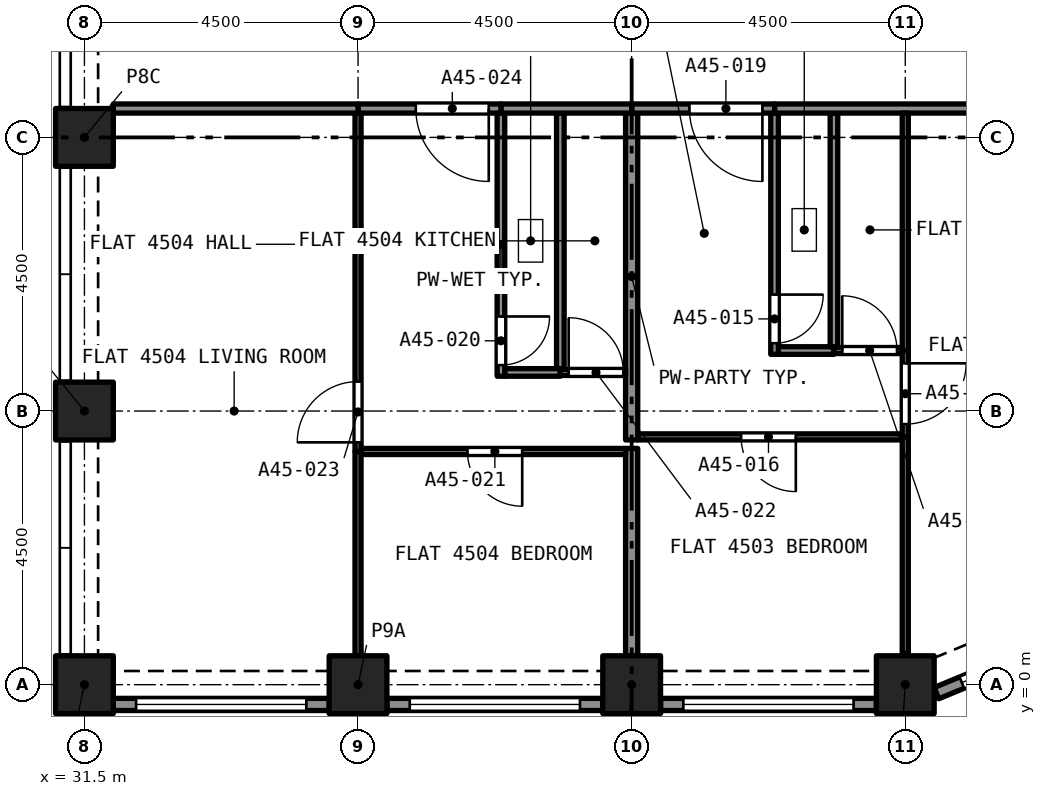
"""IFC4 building model, lengths in metres.
Left out: names, types, materials, properties, quantities, classifications, styles, units other than length and angle.
Written with IfcOpenShell. Run it as: python <this file> out.ifc"""

import sys

from ifc_helpers import new_model, si_unit, direction, frame, frame_2d, origin, origin_2d, place, context, subcontext, project, spatial, rectangle, extrude, element, fill, save


model = new_model("IFC4")
c1 = context("Model", 3, precision=1e-05, world=origin(), true_north=direction((0.0, 1.0)))
c2 = subcontext(c1, "Body", "Model", "MODEL_VIEW")
j1 = project(units=[si_unit("LENGTHUNIT", "METRE"), si_unit("PLANEANGLEUNIT", "RADIAN")], contexts=[c1])
p1 = place(None, origin())
s1 = spatial("IfcSite", under=j1, at=p1, CompositionType="ELEMENT")
p2 = place(p1, origin())
s2 = spatial("IfcBuilding", under=s1, at=p2, CompositionType="ELEMENT")
p3 = place(p2, frame((0.0, 0.0, 163.8)))
s3 = spatial("IfcBuildingStorey", under=s2, at=p3, CompositionType="ELEMENT", Elevation=163.8)
for number, where, z_axis, x_axis in (
    (1, (31.5, 0.0, 0.0), (0.0, 0.0, 1.0), (1.0, 0.0, 0.0)),
    (2, (36.0, 0.0, 0.0), (0.0, 0.0, 1.0), (1.0, 0.0, 0.0)),
    (3, (40.5, 0.0, 0.0), (0.0, 0.0, 1.0), (1.0, 0.0, 0.0)),
    (4, (45.0, 0.0, 0.0), (0.0, 0.0, 1.0), (1.0, 0.0, 0.0)),
    (5, (31.5, 4.5, 0.0), (0.0, 0.0, 1.0), (1.0, 0.0, 0.0)),
    (6, (31.5, 9.0, 0.0), (0.0, 0.0, 1.0), (1.0, 0.0, 0.0)),
):
    element("IfcColumn", number, at=place(p3, frame(where, z_axis=z_axis, x_axis=x_axis)), inside=s3, PredefinedType="COLUMN", context=c2, shape_type="SweptSolid", body=[
        extrude(rectangle(XDim=0.95, YDim=0.95, at=origin_2d()), origin(), (0.0, 0.0, 1.0), 4.4),
    ])
p4 = place(p3, frame((35.525, -0.325, 0.0), z_axis=(0.0, 0.0, 1.0), x_axis=(-1.0, 0.0, 0.0)))
e7 = element("IfcWall", 7, at=p4, inside=s3, PredefinedType="SOLIDWALL", context=c2, shape_type="SweptSolid", body=[
    extrude(rectangle(XDim=3.55, YDim=0.2, at=frame_2d((1.775, 0.0))), origin(), (0.0, 0.0, 1.0), 4.4),
])
p5 = place(p4, frame((0.375, 0.0, 0.45)))
e8 = element("IfcOpeningElement", 8, at=p5, cuts=e7, PredefinedType="OPENING", context=c2, shape_type="SweptSolid", body=[
    extrude(rectangle(XDim=2.8, YDim=2.55, at=frame_2d((1.4, 1.275))), frame((0.0, 0.11, 0.0), z_axis=(0.0, -1.0, 0.0), x_axis=(1.0, 0.0, 0.0)), (0.0, 0.0, 1.0), 0.22),
])
p6 = place(p3, frame((40.025, -0.325, 0.0), z_axis=(0.0, 0.0, 1.0), x_axis=(-1.0, 0.0, 0.0)))
e9 = element("IfcWall", 9, at=p6, inside=s3, PredefinedType="SOLIDWALL", context=c2, shape_type="SweptSolid", body=[
    extrude(rectangle(XDim=3.55, YDim=0.2, at=frame_2d((1.775, 0.0))), origin(), (0.0, 0.0, 1.0), 4.4),
])
p7 = place(p6, frame((0.375, 0.0, 0.45)))
e10 = element("IfcOpeningElement", 10, at=p7, cuts=e9, PredefinedType="OPENING", context=c2, shape_type="SweptSolid", body=[
    extrude(rectangle(XDim=2.8, YDim=2.55, at=frame_2d((1.4, 1.275))), frame((0.0, 0.11, 0.0), z_axis=(0.0, -1.0, 0.0), x_axis=(1.0, 0.0, 0.0)), (0.0, 0.0, 1.0), 0.22),
])
p8 = place(p3, frame((44.525, -0.325, 0.0), z_axis=(0.0, 0.0, 1.0), x_axis=(-1.0, 0.0, 0.0)))
e11 = element("IfcWall", 11, at=p8, inside=s3, PredefinedType="SOLIDWALL", context=c2, shape_type="SweptSolid", body=[
    extrude(rectangle(XDim=3.55, YDim=0.2, at=frame_2d((1.775, 0.0))), origin(), (0.0, 0.0, 1.0), 4.4),
])
p9 = place(p8, frame((0.375, 0.0, 0.45)))
e12 = element("IfcOpeningElement", 12, at=p9, cuts=e11, PredefinedType="OPENING", context=c2, shape_type="SweptSolid", body=[
    extrude(rectangle(XDim=2.8, YDim=2.55, at=frame_2d((1.4, 1.275))), frame((0.0, 0.11, 0.0), z_axis=(0.0, -1.0, 0.0), x_axis=(1.0, 0.0, 0.0)), (0.0, 0.0, 1.0), 0.22),
])
p10 = place(p3, frame((47.733, 0.78, 0.0), z_axis=(0.0, 0.0, 1.0), x_axis=(-0.923880599843, -0.382680855588, 0.0)))
e13 = element("IfcWall", 13, at=p10, inside=s3, PredefinedType="SOLIDWALL", context=c2, shape_type="SweptSolid", body=[
    extrude(rectangle(XDim=2.403, YDim=0.2, at=frame_2d((1.201, 0.0))), origin(), (0.0, 0.0, 1.0), 4.4),
])
p11 = place(p10, frame((0.251, 0.0, 0.45)))
e14 = element("IfcOpeningElement", 14, at=p11, cuts=e13, PredefinedType="OPENING", context=c2, shape_type="SweptSolid", body=[
    extrude(rectangle(XDim=1.7, YDim=2.55, at=frame_2d((0.85, 1.275))), frame((0.0, 0.11, 0.0), z_axis=(0.0, -1.0, 0.0), x_axis=(1.0, 0.0, 0.0)), (0.0, 0.0, 1.0), 0.22),
])
p12 = place(p3, frame((42.913, 5.495, 0.0), z_axis=(0.0, 0.0, 1.0), x_axis=(1.0, 0.0, 0.0)))
e15 = element("IfcWall", 15, at=p12, inside=s3, PredefinedType="PARTITIONING", context=c2, shape_type="SweptSolid", body=[
    extrude(rectangle(XDim=0.915, YDim=0.125, at=frame_2d((0.458, 0.0))), origin(), (0.0, 0.0, 1.0), 4.1),
])
p13 = place(p3, frame((42.85, 9.4, 0.0), z_axis=(0.0, 0.0, 1.0), x_axis=(0.0, -1.0, 0.0)))
e16 = element("IfcWall", 16, at=p13, inside=s3, PredefinedType="PARTITIONING", context=c2, shape_type="SweptSolid", body=[
    extrude(rectangle(XDim=3.967, YDim=0.125, at=frame_2d((1.984, 0.0))), origin(), (0.0, 0.0, 1.0), 4.1),
])
p14 = place(p13, frame((2.985, 0.0, 0.0)))
e17 = element("IfcOpeningElement", 17, at=p14, cuts=e16, PredefinedType="OPENING", context=c2, shape_type="SweptSolid", body=[
    extrude(rectangle(XDim=0.8, YDim=2.1, at=frame_2d((0.4, 1.05))), frame((0.0, 0.073, 0.0), z_axis=(0.0, -1.0, 0.0), x_axis=(1.0, 0.0, 0.0)), (0.0, 0.0, 1.0), 0.145),
])
p15 = place(p3, frame((43.827, 5.558, 0.0), z_axis=(0.0, 0.0, 1.0), x_axis=(0.0, 1.0, 0.0)))
e18 = element("IfcWall", 18, at=p15, inside=s3, PredefinedType="PARTITIONING", context=c2, shape_type="SweptSolid", body=[
    extrude(rectangle(XDim=3.842, YDim=0.125, at=frame_2d((1.921, 0.0))), origin(), (0.0, 0.0, 1.0), 4.1),
])
p16 = place(p3, frame((42.85, 9.475, 0.0), z_axis=(0.0, 0.0, 1.0), x_axis=(1.0, 0.0, 0.0)))
e19 = element("IfcWall", 19, at=p16, inside=s3, PredefinedType="PARTITIONING", context=c2, shape_type="SweptSolid", body=[
    extrude(rectangle(XDim=6.175, YDim=0.15, at=frame_2d((3.087, 0.0))), origin(), (0.0, 0.0, 1.0), 4.1),
])
p17 = place(p3, frame((44.95, 4.075, 0.0), z_axis=(0.0, 0.0, 1.0), x_axis=(-1.0, 0.0, 0.0)))
e20 = element("IfcWall", 20, at=p17, inside=s3, PredefinedType="PARTITIONING", context=c2, shape_type="SweptSolid", body=[
    extrude(rectangle(XDim=4.35, YDim=0.1, at=frame_2d((2.175, 0.0))), origin(), (0.0, 0.0, 1.0), 4.1),
])
p18 = place(p17, frame((1.75, 0.0, 0.0)))
e21 = element("IfcOpeningElement", 21, at=p18, cuts=e20, PredefinedType="OPENING", context=c2, shape_type="SweptSolid", body=[
    extrude(rectangle(XDim=0.9, YDim=2.1, at=frame_2d((0.45, 1.05))), frame((0.0, 0.06, 0.0), z_axis=(0.0, -1.0, 0.0), x_axis=(1.0, 0.0, 0.0)), (0.0, 0.0, 1.0), 0.12),
])
p19 = place(p3, frame((45.0, 0.514, 0.0), z_axis=(0.0, 0.0, 1.0), x_axis=(0.0, 1.0, 0.0)))
e22 = element("IfcWall", 22, at=p19, inside=s3, PredefinedType="PARTITIONING", context=c2, shape_type="SweptSolid", body=[
    extrude(rectangle(XDim=3.561, YDim=0.1, at=frame_2d((1.78, 0.0))), origin(), (0.0, 0.0, 1.0), 4.1),
])
p20 = place(p3, frame((40.5, 0.475, 0.0), z_axis=(0.0, 0.0, 1.0), x_axis=(0.0, 1.0, 0.0)))
e23 = element("IfcWall", 23, at=p20, inside=s3, PredefinedType="PARTITIONING", context=c2, shape_type="SweptSolid", body=[
    extrude(rectangle(XDim=3.41, YDim=0.2, at=frame_2d((1.705, 0.0))), origin(), (0.0, 0.0, 1.0), 4.1),
])
p21 = place(p3, frame((43.827, 5.495, 0.0), z_axis=(0.0, 0.0, 1.0), x_axis=(1.0, 0.0, 0.0)))
e24 = element("IfcWall", 24, at=p21, inside=s3, PredefinedType="PARTITIONING", context=c2, shape_type="SweptSolid", body=[
    extrude(rectangle(XDim=1.123, YDim=0.1, at=frame_2d((0.561, 0.0))), origin(), (0.0, 0.0, 1.0), 4.1),
])
p22 = place(p21, frame((0.136, 0.0, 0.0)))
e25 = element("IfcOpeningElement", 25, at=p22, cuts=e24, PredefinedType="OPENING", context=c2, shape_type="SweptSolid", body=[
    extrude(rectangle(XDim=0.9, YDim=2.1, at=frame_2d((0.45, 1.05))), frame((0.0, 0.06, 0.0), z_axis=(0.0, -1.0, 0.0), x_axis=(1.0, 0.0, 0.0)), (0.0, 0.0, 1.0), 0.12),
])
p23 = place(p3, frame((45.0, 5.495, 0.0), z_axis=(0.0, 0.0, 1.0), x_axis=(0.0, -1.0, 0.0)))
e26 = element("IfcWall", 26, at=p23, inside=s3, PredefinedType="PARTITIONING", context=c2, shape_type="SweptSolid", body=[
    extrude(rectangle(XDim=1.42, YDim=0.1, at=frame_2d((0.71, 0.0))), origin(), (0.0, 0.0, 1.0), 4.1),
])
p24 = place(p23, frame((0.21, 0.0, 0.0)))
e27 = element("IfcOpeningElement", 27, at=p24, cuts=e26, PredefinedType="OPENING", context=c2, shape_type="SweptSolid", body=[
    extrude(rectangle(XDim=1.0, YDim=2.1, at=frame_2d((0.5, 1.05))), frame((0.0, 0.06, 0.0), z_axis=(0.0, -1.0, 0.0), x_axis=(1.0, 0.0, 0.0)), (0.0, 0.0, 1.0), 0.12),
])
p25 = place(p3, frame((40.5, 4.025, 0.0), z_axis=(0.0, 0.0, 1.0), x_axis=(0.0, 1.0, 0.0)))
e28 = element("IfcWall", 28, at=p25, inside=s3, PredefinedType="PARTITIONING", context=c2, shape_type="SweptSolid", body=[
    extrude(rectangle(XDim=5.375, YDim=0.2, at=frame_2d((2.688, 0.0))), origin(), (0.0, 0.0, 1.0), 4.1),
])
p26 = place(p3, frame((42.85, 9.475, 0.0), z_axis=(0.0, 0.0, 1.0), x_axis=(-1.0, 0.0, 0.0)))
e29 = element("IfcWall", 29, at=p26, inside=s3, PredefinedType="PARTITIONING", context=c2, shape_type="SweptSolid", body=[
    extrude(rectangle(XDim=2.35, YDim=0.15, at=frame_2d((1.175, 0.0))), origin(), (0.0, 0.0, 1.0), 4.1),
])
p27 = place(p26, frame((0.2, 0.0, 0.0)))
e30 = element("IfcOpeningElement", 30, at=p27, cuts=e29, PredefinedType="OPENING", context=c2, shape_type="SweptSolid", body=[
    extrude(rectangle(XDim=1.2, YDim=2.4, at=frame_2d((0.6, 1.2))), frame((0.0, 0.085, 0.0), z_axis=(0.0, -1.0, 0.0), x_axis=(1.0, 0.0, 0.0)), (0.0, 0.0, 1.0), 0.17),
])
p28 = place(p3, frame((45.0, 5.495, 0.0), z_axis=(0.0, 0.0, 1.0), x_axis=(0.0, 1.0, 0.0)))
e31 = element("IfcWall", 31, at=p28, inside=s3, PredefinedType="PARTITIONING", context=c2, shape_type="SweptSolid", body=[
    extrude(rectangle(XDim=3.905, YDim=0.1, at=frame_2d((1.952, 0.0))), origin(), (0.0, 0.0, 1.0), 4.1),
])
p29 = place(p3, frame((38.413, 5.135, 0.0), z_axis=(0.0, 0.0, 1.0), x_axis=(1.0, 0.0, 0.0)))
e32 = element("IfcWall", 32, at=p29, inside=s3, PredefinedType="PARTITIONING", context=c2, shape_type="SweptSolid", body=[
    extrude(rectangle(XDim=0.915, YDim=0.125, at=frame_2d((0.458, 0.0))), origin(), (0.0, 0.0, 1.0), 4.1),
])
p30 = place(p3, frame((38.35, 9.4, 0.0), z_axis=(0.0, 0.0, 1.0), x_axis=(0.0, -1.0, 0.0)))
e33 = element("IfcWall", 33, at=p30, inside=s3, PredefinedType="PARTITIONING", context=c2, shape_type="SweptSolid", body=[
    extrude(rectangle(XDim=4.327, YDim=0.125, at=frame_2d((2.164, 0.0))), origin(), (0.0, 0.0, 1.0), 4.1),
])
p31 = place(p30, frame((3.345, 0.0, 0.0)))
e34 = element("IfcOpeningElement", 34, at=p31, cuts=e33, PredefinedType="OPENING", context=c2, shape_type="SweptSolid", body=[
    extrude(rectangle(XDim=0.8, YDim=2.1, at=frame_2d((0.4, 1.05))), frame((0.0, 0.073, 0.0), z_axis=(0.0, -1.0, 0.0), x_axis=(1.0, 0.0, 0.0)), (0.0, 0.0, 1.0), 0.145),
])
p32 = place(p3, frame((39.327, 5.198, 0.0), z_axis=(0.0, 0.0, 1.0), x_axis=(0.0, 1.0, 0.0)))
e35 = element("IfcWall", 35, at=p32, inside=s3, PredefinedType="PARTITIONING", context=c2, shape_type="SweptSolid", body=[
    extrude(rectangle(XDim=4.202, YDim=0.125, at=frame_2d((2.101, 0.0))), origin(), (0.0, 0.0, 1.0), 4.1),
])
p33 = place(p3, frame((38.35, 9.475, 0.0), z_axis=(0.0, 0.0, 1.0), x_axis=(1.0, 0.0, 0.0)))
e36 = element("IfcWall", 36, at=p33, inside=s3, PredefinedType="PARTITIONING", context=c2, shape_type="SweptSolid", body=[
    extrude(rectangle(XDim=2.15, YDim=0.15, at=frame_2d((1.075, 0.0))), origin(), (0.0, 0.0, 1.0), 4.1),
])
p34 = place(p3, frame((40.4, 3.835, 0.0), z_axis=(0.0, 0.0, 1.0), x_axis=(-1.0, 0.0, 0.0)))
e37 = element("IfcWall", 37, at=p34, inside=s3, PredefinedType="PARTITIONING", context=c2, shape_type="SweptSolid", body=[
    extrude(rectangle(XDim=4.35, YDim=0.1, at=frame_2d((2.175, 0.0))), origin(), (0.0, 0.0, 1.0), 4.1),
])
p35 = place(p34, frame((1.7, 0.0, 0.0)))
e38 = element("IfcOpeningElement", 38, at=p35, cuts=e37, PredefinedType="OPENING", context=c2, shape_type="SweptSolid", body=[
    extrude(rectangle(XDim=0.9, YDim=2.1, at=frame_2d((0.45, 1.05))), frame((0.0, 0.06, 0.0), z_axis=(0.0, -1.0, 0.0), x_axis=(1.0, 0.0, 0.0)), (0.0, 0.0, 1.0), 0.12),
])
p36 = place(p3, frame((36.0, 0.475, 0.0), z_axis=(0.0, 0.0, 1.0), x_axis=(0.0, 1.0, 0.0)))
e39 = element("IfcWall", 39, at=p36, inside=s3, PredefinedType="PARTITIONING", context=c2, shape_type="SweptSolid", body=[
    extrude(rectangle(XDim=3.36, YDim=0.1, at=frame_2d((1.68, 0.0))), origin(), (0.0, 0.0, 1.0), 4.1),
])
p37 = place(p3, frame((39.327, 5.135, 0.0), z_axis=(0.0, 0.0, 1.0), x_axis=(1.0, 0.0, 0.0)))
e40 = element("IfcWall", 40, at=p37, inside=s3, PredefinedType="PARTITIONING", context=c2, shape_type="SweptSolid", body=[
    extrude(rectangle(XDim=1.073, YDim=0.1, at=frame_2d((0.536, 0.0))), origin(), (0.0, 0.0, 1.0), 4.1),
])
p38 = place(p37, frame((0.136, 0.0, 0.0)))
e41 = element("IfcOpeningElement", 41, at=p38, cuts=e40, PredefinedType="OPENING", context=c2, shape_type="SweptSolid", body=[
    extrude(rectangle(XDim=0.9, YDim=2.1, at=frame_2d((0.45, 1.05))), frame((0.0, 0.06, 0.0), z_axis=(0.0, -1.0, 0.0), x_axis=(1.0, 0.0, 0.0)), (0.0, 0.0, 1.0), 0.12),
])
p39 = place(p3, frame((36.0, 3.835, 0.0), z_axis=(0.0, 0.0, 1.0), x_axis=(0.0, 1.0, 0.0)))
e42 = element("IfcWall", 42, at=p39, inside=s3, PredefinedType="PARTITIONING", context=c2, shape_type="SweptSolid", body=[
    extrude(rectangle(XDim=5.565, YDim=0.1, at=frame_2d((2.782, 0.0))), origin(), (0.0, 0.0, 1.0), 4.1),
])
p40 = place(p39, frame((0.15, 0.0, 0.0)))
e43 = element("IfcOpeningElement", 43, at=p40, cuts=e42, PredefinedType="OPENING", context=c2, shape_type="SweptSolid", body=[
    extrude(rectangle(XDim=1.0, YDim=2.1, at=frame_2d((0.5, 1.05))), frame((0.0, 0.06, 0.0), z_axis=(0.0, -1.0, 0.0), x_axis=(1.0, 0.0, 0.0)), (0.0, 0.0, 1.0), 0.12),
])
p41 = place(p3, frame((38.35, 9.475, 0.0), z_axis=(0.0, 0.0, 1.0), x_axis=(-1.0, 0.0, 0.0)))
e44 = element("IfcWall", 44, at=p41, inside=s3, PredefinedType="PARTITIONING", context=c2, shape_type="SweptSolid", body=[
    extrude(rectangle(XDim=2.35, YDim=0.15, at=frame_2d((1.175, 0.0))), origin(), (0.0, 0.0, 1.0), 4.1),
])
p42 = place(p41, frame((0.2, 0.0, 0.0)))
e45 = element("IfcOpeningElement", 45, at=p42, cuts=e44, PredefinedType="OPENING", context=c2, shape_type="SweptSolid", body=[
    extrude(rectangle(XDim=1.2, YDim=2.4, at=frame_2d((0.6, 1.2))), frame((0.0, 0.085, 0.0), z_axis=(0.0, -1.0, 0.0), x_axis=(1.0, 0.0, 0.0)), (0.0, 0.0, 1.0), 0.17),
])
p43 = place(p3, frame((31.975, 9.475, 0.0), z_axis=(0.0, 0.0, 1.0), x_axis=(1.0, 0.0, 0.0)))
e46 = element("IfcWall", 46, at=p43, inside=s3, PredefinedType="PARTITIONING", context=c2, shape_type="SweptSolid", body=[
    extrude(rectangle(XDim=4.025, YDim=0.15, at=frame_2d((2.012, 0.0))), origin(), (0.0, 0.0, 1.0), 4.1),
])
p44 = place(p5, origin())
e47 = element("IfcWindow", 47, at=p44, inside=s3, PartitioningType="SINGLE_PANEL", PredefinedType="WINDOW", context=c2, shape_type="SweptSolid", body=[
    extrude(rectangle(XDim=2.8, YDim=2.55, at=frame_2d((1.4, 1.275))), frame((0.0, 0.03, 0.0), z_axis=(0.0, -1.0, 0.0), x_axis=(1.0, 0.0, 0.0)), (0.0, 0.0, 1.0), 0.06),
])
fill(e8, e47)
p45 = place(p7, origin())
e48 = element("IfcWindow", 48, at=p45, inside=s3, PartitioningType="SINGLE_PANEL", PredefinedType="WINDOW", context=c2, shape_type="SweptSolid", body=[
    extrude(rectangle(XDim=2.8, YDim=2.55, at=frame_2d((1.4, 1.275))), frame((0.0, 0.03, 0.0), z_axis=(0.0, -1.0, 0.0), x_axis=(1.0, 0.0, 0.0)), (0.0, 0.0, 1.0), 0.06),
])
fill(e10, e48)
p46 = place(p9, origin())
e49 = element("IfcWindow", 49, at=p46, inside=s3, PartitioningType="SINGLE_PANEL", PredefinedType="WINDOW", context=c2, shape_type="SweptSolid", body=[
    extrude(rectangle(XDim=2.8, YDim=2.55, at=frame_2d((1.4, 1.275))), frame((0.0, 0.03, 0.0), z_axis=(0.0, -1.0, 0.0), x_axis=(1.0, 0.0, 0.0)), (0.0, 0.0, 1.0), 0.06),
])
fill(e12, e49)
p47 = place(p11, origin())
e50 = element("IfcWindow", 50, at=p47, inside=s3, PartitioningType="SINGLE_PANEL", PredefinedType="WINDOW", context=c2, shape_type="SweptSolid", body=[
    extrude(rectangle(XDim=1.7, YDim=2.55, at=frame_2d((0.85, 1.275))), frame((0.0, 0.03, 0.0), z_axis=(0.0, -1.0, 0.0), x_axis=(1.0, 0.0, 0.0)), (0.0, 0.0, 1.0), 0.06),
])
fill(e14, e50)
p48 = place(p14, origin())
e51 = element("IfcDoor", 51, at=p48, inside=s3, OperationType="SINGLE_SWING_RIGHT", PredefinedType="DOOR", context=c2, shape_type="SweptSolid", body=[
    extrude(rectangle(XDim=0.8, YDim=2.1, at=frame_2d((0.4, 1.05))), frame((0.0, 0.025, 0.0), z_axis=(0.0, -1.0, 0.0), x_axis=(1.0, 0.0, 0.0)), (0.0, 0.0, 1.0), 0.05),
])
fill(e17, e51)
p49 = place(p18, origin())
e52 = element("IfcDoor", 52, at=p49, inside=s3, OperationType="SINGLE_SWING_RIGHT", PredefinedType="DOOR", context=c2, shape_type="SweptSolid", body=[
    extrude(rectangle(XDim=0.9, YDim=2.1, at=frame_2d((0.45, 1.05))), frame((0.0, 0.025, 0.0), z_axis=(0.0, -1.0, 0.0), x_axis=(1.0, 0.0, 0.0)), (0.0, 0.0, 1.0), 0.05),
])
fill(e21, e52)
p50 = place(p22, origin())
e53 = element("IfcDoor", 53, at=p50, inside=s3, OperationType="SINGLE_SWING_RIGHT", PredefinedType="DOOR", context=c2, shape_type="SweptSolid", body=[
    extrude(rectangle(XDim=0.9, YDim=2.1, at=frame_2d((0.45, 1.05))), frame((0.0, 0.025, 0.0), z_axis=(0.0, -1.0, 0.0), x_axis=(1.0, 0.0, 0.0)), (0.0, 0.0, 1.0), 0.05),
])
fill(e25, e53)
p51 = place(p24, origin())
e54 = element("IfcDoor", 54, at=p51, inside=s3, OperationType="SINGLE_SWING_RIGHT", PredefinedType="DOOR", context=c2, shape_type="SweptSolid", body=[
    extrude(rectangle(XDim=1.0, YDim=2.1, at=frame_2d((0.5, 1.05))), frame((0.0, 0.025, 0.0), z_axis=(0.0, -1.0, 0.0), x_axis=(1.0, 0.0, 0.0)), (0.0, 0.0, 1.0), 0.05),
])
fill(e27, e54)
p52 = place(p27, origin())
e55 = element("IfcDoor", 55, at=p52, inside=s3, OperationType="SINGLE_SWING_LEFT", PredefinedType="DOOR", context=c2, shape_type="SweptSolid", body=[
    extrude(rectangle(XDim=1.2, YDim=2.4, at=frame_2d((0.6, 1.2))), frame((0.0, 0.025, 0.0), z_axis=(0.0, -1.0, 0.0), x_axis=(1.0, 0.0, 0.0)), (0.0, 0.0, 1.0), 0.05),
])
fill(e30, e55)
p53 = place(p31, origin())
e56 = element("IfcDoor", 56, at=p53, inside=s3, OperationType="SINGLE_SWING_RIGHT", PredefinedType="DOOR", context=c2, shape_type="SweptSolid", body=[
    extrude(rectangle(XDim=0.8, YDim=2.1, at=frame_2d((0.4, 1.05))), frame((0.0, 0.025, 0.0), z_axis=(0.0, -1.0, 0.0), x_axis=(1.0, 0.0, 0.0)), (0.0, 0.0, 1.0), 0.05),
])
fill(e34, e56)
p54 = place(p35, origin())
e57 = element("IfcDoor", 57, at=p54, inside=s3, OperationType="SINGLE_SWING_LEFT", PredefinedType="DOOR", context=c2, shape_type="SweptSolid", body=[
    extrude(rectangle(XDim=0.9, YDim=2.1, at=frame_2d((0.45, 1.05))), frame((0.0, 0.025, 0.0), z_axis=(0.0, -1.0, 0.0), x_axis=(1.0, 0.0, 0.0)), (0.0, 0.0, 1.0), 0.05),
])
fill(e38, e57)
p55 = place(p38, origin())
e58 = element("IfcDoor", 58, at=p55, inside=s3, OperationType="SINGLE_SWING_RIGHT", PredefinedType="DOOR", context=c2, shape_type="SweptSolid", body=[
    extrude(rectangle(XDim=0.9, YDim=2.1, at=frame_2d((0.45, 1.05))), frame((0.0, 0.025, 0.0), z_axis=(0.0, -1.0, 0.0), x_axis=(1.0, 0.0, 0.0)), (0.0, 0.0, 1.0), 0.05),
])
fill(e41, e58)
p56 = place(p40, origin())
e59 = element("IfcDoor", 59, at=p56, inside=s3, OperationType="SINGLE_SWING_LEFT", PredefinedType="DOOR", context=c2, shape_type="SweptSolid", body=[
    extrude(rectangle(XDim=1.0, YDim=2.1, at=frame_2d((0.5, 1.05))), frame((0.0, 0.025, 0.0), z_axis=(0.0, -1.0, 0.0), x_axis=(1.0, 0.0, 0.0)), (0.0, 0.0, 1.0), 0.05),
])
fill(e43, e59)
p57 = place(p42, origin())
e60 = element("IfcDoor", 60, at=p57, inside=s3, OperationType="SINGLE_SWING_LEFT", PredefinedType="DOOR", context=c2, shape_type="SweptSolid", body=[
    extrude(rectangle(XDim=1.2, YDim=2.4, at=frame_2d((0.6, 1.2))), frame((0.0, 0.025, 0.0), z_axis=(0.0, -1.0, 0.0), x_axis=(1.0, 0.0, 0.0)), (0.0, 0.0, 1.0), 0.05),
])
fill(e45, e60)
save(model, sys.argv[1])
